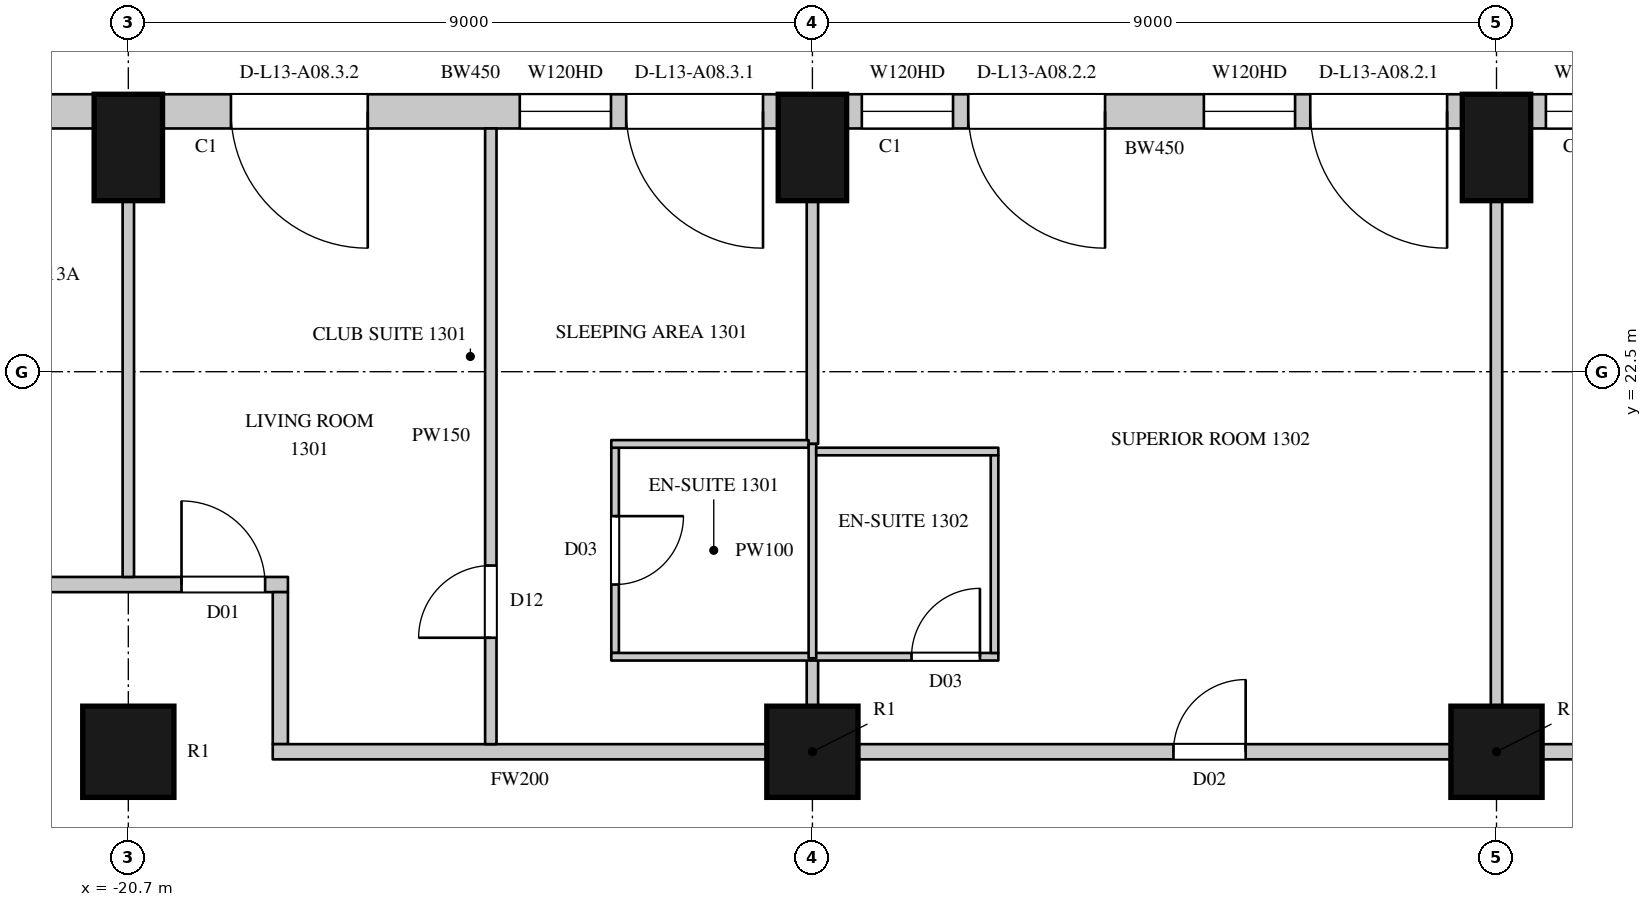
"""IFC4 building model, lengths in metres.
Left out: names, types, materials, properties, quantities, classifications, styles, units other than length and angle.
Written with IfcOpenShell. Run it as: python <this file> out.ifc"""

import sys

from ifc_helpers import new_model, si_unit, direction, frame, frame_2d, origin, origin_2d, place, context, subcontext, project, spatial, rectangle, circle, extrude, element, fill, save


model = new_model("IFC4")
c1 = context("Model", 3, precision=1e-05, world=origin(), true_north=direction((0.0, 1.0)))
c2 = subcontext(c1, "Body", "Model", "MODEL_VIEW")
j1 = project(units=[si_unit("LENGTHUNIT", "METRE"), si_unit("PLANEANGLEUNIT", "RADIAN")], contexts=[c1])
p1 = place(None, origin())
s1 = spatial("IfcSite", under=j1, at=p1, CompositionType="ELEMENT")
p2 = place(p1, origin())
s2 = spatial("IfcBuilding", under=s1, at=p2, CompositionType="ELEMENT")
p3 = place(p2, frame((0.0, 0.0, 77.1)))
s3 = spatial("IfcBuildingStorey", under=s2, at=p3, CompositionType="ELEMENT", Elevation=77.1)
for number, where, z_axis, x_axis in (
    (1, (-2.7, 25.45, 0.0), (0.0, 0.0, 1.0), (-1.0, 0.0, 0.0)),
    (2, (-11.7, 25.45, 0.0), (0.0, 0.0, 1.0), (-1.0, 0.0, 0.0)),
    (3, (-20.7, 25.45, 0.0), (0.0, 0.0, 1.0), (-1.0, 0.0, 0.0)),
):
    element("IfcColumn", number, at=place(p3, frame(where, z_axis=z_axis, x_axis=x_axis)), inside=s3, PredefinedType="COLUMN", context=c2, shape_type="SweptSolid", body=[
        extrude(rectangle(XDim=0.9, YDim=1.4, at=origin_2d()), origin(), (0.0, 0.0, 1.0), 3.6),
    ])
for number, where, z_axis, x_axis in (
    (4, (-20.7, 17.5, 0.0), (0.0, 0.0, 1.0), (1.0, 0.0, 0.0)),
    (5, (-11.7, 17.5, 0.0), (0.0, 0.0, 1.0), (1.0, 0.0, 0.0)),
    (6, (-2.7, 17.5, 0.0), (0.0, 0.0, 1.0), (1.0, 0.0, 0.0)),
):
    element("IfcColumn", number, at=place(p3, frame(where, z_axis=z_axis, x_axis=x_axis)), inside=s3, PredefinedType="COLUMN", context=c2, shape_type="SweptSolid", body=[
        extrude(circle(Radius=0.6, at=origin_2d()), origin(), (0.0, 0.0, 1.0), 3.6),
    ])
p4 = place(p3, frame((5.85, 25.925, 0.0), z_axis=(0.0, 0.0, 1.0), x_axis=(-1.0, 0.0, 0.0)))
e7 = element("IfcWall", 7, at=p4, inside=s3, PredefinedType="SOLIDWALL", context=c2, shape_type="SweptSolid", body=[
    extrude(rectangle(XDim=8.1, YDim=0.45, at=frame_2d((4.05, 0.0))), origin(), (0.0, 0.0, 1.0), 3.3),
])
p5 = place(p4, frame((0.2, 0.0, 0.0)))
e8 = element("IfcOpeningElement", 8, at=p5, cuts=e7, PredefinedType="OPENING", context=c2, shape_type="SweptSolid", body=[
    extrude(rectangle(XDim=1.8, YDim=2.4, at=frame_2d((0.9, 1.2))), frame((0.0, 0.235, 0.0), z_axis=(0.0, -1.0, 0.0), x_axis=(1.0, 0.0, 0.0)), (0.0, 0.0, 1.0), 0.47),
])
p6 = place(p4, frame((2.2, 0.0, 1.05)))
e9 = element("IfcOpeningElement", 9, at=p6, cuts=e7, PredefinedType="OPENING", context=c2, shape_type="SweptSolid", body=[
    extrude(rectangle(XDim=1.2, YDim=2.0, at=frame_2d((0.6, 1.0))), frame((0.0, 0.235, 0.0), z_axis=(0.0, -1.0, 0.0), x_axis=(1.0, 0.0, 0.0)), (0.0, 0.0, 1.0), 0.47),
])
p7 = place(p4, frame((4.7, 0.0, 0.0)))
e10 = element("IfcOpeningElement", 10, at=p7, cuts=e7, PredefinedType="OPENING", context=c2, shape_type="SweptSolid", body=[
    extrude(rectangle(XDim=1.8, YDim=2.4, at=frame_2d((0.9, 1.2))), frame((0.0, 0.235, 0.0), z_axis=(0.0, -1.0, 0.0), x_axis=(1.0, 0.0, 0.0)), (0.0, 0.0, 1.0), 0.47),
])
p8 = place(p4, frame((6.7, 0.0, 1.05)))
e11 = element("IfcOpeningElement", 11, at=p8, cuts=e7, PredefinedType="OPENING", context=c2, shape_type="SweptSolid", body=[
    extrude(rectangle(XDim=1.2, YDim=2.0, at=frame_2d((0.6, 1.0))), frame((0.0, 0.235, 0.0), z_axis=(0.0, -1.0, 0.0), x_axis=(1.0, 0.0, 0.0)), (0.0, 0.0, 1.0), 0.47),
])
p9 = place(p3, frame((-3.15, 25.925, 0.0), z_axis=(0.0, 0.0, 1.0), x_axis=(-1.0, 0.0, 0.0)))
e12 = element("IfcWall", 12, at=p9, inside=s3, PredefinedType="SOLIDWALL", context=c2, shape_type="SweptSolid", body=[
    extrude(rectangle(XDim=8.1, YDim=0.45, at=frame_2d((4.05, 0.0))), origin(), (0.0, 0.0, 1.0), 3.3),
])
p10 = place(p9, frame((0.2, 0.0, 0.0)))
e13 = element("IfcOpeningElement", 13, at=p10, cuts=e12, PredefinedType="OPENING", context=c2, shape_type="SweptSolid", body=[
    extrude(rectangle(XDim=1.8, YDim=2.4, at=frame_2d((0.9, 1.2))), frame((0.0, 0.235, 0.0), z_axis=(0.0, -1.0, 0.0), x_axis=(1.0, 0.0, 0.0)), (0.0, 0.0, 1.0), 0.47),
])
p11 = place(p9, frame((2.2, 0.0, 1.05)))
e14 = element("IfcOpeningElement", 14, at=p11, cuts=e12, PredefinedType="OPENING", context=c2, shape_type="SweptSolid", body=[
    extrude(rectangle(XDim=1.2, YDim=2.0, at=frame_2d((0.6, 1.0))), frame((0.0, 0.235, 0.0), z_axis=(0.0, -1.0, 0.0), x_axis=(1.0, 0.0, 0.0)), (0.0, 0.0, 1.0), 0.47),
])
p12 = place(p9, frame((4.7, 0.0, 0.0)))
e15 = element("IfcOpeningElement", 15, at=p12, cuts=e12, PredefinedType="OPENING", context=c2, shape_type="SweptSolid", body=[
    extrude(rectangle(XDim=1.8, YDim=2.4, at=frame_2d((0.9, 1.2))), frame((0.0, 0.235, 0.0), z_axis=(0.0, -1.0, 0.0), x_axis=(1.0, 0.0, 0.0)), (0.0, 0.0, 1.0), 0.47),
])
p13 = place(p9, frame((6.7, 0.0, 1.05)))
e16 = element("IfcOpeningElement", 16, at=p13, cuts=e12, PredefinedType="OPENING", context=c2, shape_type="SweptSolid", body=[
    extrude(rectangle(XDim=1.2, YDim=2.0, at=frame_2d((0.6, 1.0))), frame((0.0, 0.235, 0.0), z_axis=(0.0, -1.0, 0.0), x_axis=(1.0, 0.0, 0.0)), (0.0, 0.0, 1.0), 0.47),
])
p14 = place(p3, frame((-12.15, 25.925, 0.0), z_axis=(0.0, 0.0, 1.0), x_axis=(-1.0, 0.0, 0.0)))
e17 = element("IfcWall", 17, at=p14, inside=s3, PredefinedType="SOLIDWALL", context=c2, shape_type="SweptSolid", body=[
    extrude(rectangle(XDim=8.1, YDim=0.45, at=frame_2d((4.05, 0.0))), origin(), (0.0, 0.0, 1.0), 3.3),
])
p15 = place(p14, frame((0.2, 0.0, 0.0)))
e18 = element("IfcOpeningElement", 18, at=p15, cuts=e17, PredefinedType="OPENING", context=c2, shape_type="SweptSolid", body=[
    extrude(rectangle(XDim=1.8, YDim=2.4, at=frame_2d((0.9, 1.2))), frame((0.0, 0.235, 0.0), z_axis=(0.0, -1.0, 0.0), x_axis=(1.0, 0.0, 0.0)), (0.0, 0.0, 1.0), 0.47),
])
p16 = place(p14, frame((2.2, 0.0, 1.05)))
e19 = element("IfcOpeningElement", 19, at=p16, cuts=e17, PredefinedType="OPENING", context=c2, shape_type="SweptSolid", body=[
    extrude(rectangle(XDim=1.2, YDim=2.0, at=frame_2d((0.6, 1.0))), frame((0.0, 0.235, 0.0), z_axis=(0.0, -1.0, 0.0), x_axis=(1.0, 0.0, 0.0)), (0.0, 0.0, 1.0), 0.47),
])
p17 = place(p14, frame((5.4, 0.0, 0.0)))
e20 = element("IfcOpeningElement", 20, at=p17, cuts=e17, PredefinedType="OPENING", context=c2, shape_type="SweptSolid", body=[
    extrude(rectangle(XDim=1.8, YDim=2.4, at=frame_2d((0.9, 1.2))), frame((0.0, 0.235, 0.0), z_axis=(0.0, -1.0, 0.0), x_axis=(1.0, 0.0, 0.0)), (0.0, 0.0, 1.0), 0.47),
])
p18 = place(p3, frame((-21.15, 25.925, 0.0), z_axis=(0.0, 0.0, 1.0), x_axis=(-1.0, 0.0, 0.0)))
e21 = element("IfcWall", 21, at=p18, inside=s3, PredefinedType="SOLIDWALL", context=c2, shape_type="SweptSolid", body=[
    extrude(rectangle(XDim=2.914, YDim=0.45, at=frame_2d((1.457, 0.0))), origin(), (0.0, 0.0, 1.0), 3.3),
])
p19 = place(p3, frame((-23.7, 19.7, 0.0), z_axis=(0.0, 0.0, 1.0), x_axis=(1.0, 0.0, 0.0)))
e22 = element("IfcWall", 22, at=p19, inside=s3, PredefinedType="PARTITIONING", context=c2, shape_type="SweptSolid", body=[
    extrude(rectangle(XDim=5.1, YDim=0.2, at=frame_2d((2.55, 0.0))), origin(), (0.0, 0.0, 1.0), 3.3),
])
p20 = place(p19, frame((0.8, 0.0, 0.0)))
e23 = element("IfcOpeningElement", 23, at=p20, cuts=e22, PredefinedType="OPENING", context=c2, shape_type="SweptSolid", body=[
    extrude(rectangle(XDim=0.9, YDim=2.2, at=frame_2d((0.45, 1.1))), frame((0.0, 0.11, 0.0), z_axis=(0.0, -1.0, 0.0), x_axis=(1.0, 0.0, 0.0)), (0.0, 0.0, 1.0), 0.22),
])
p21 = place(p19, frame((3.7, 0.0, 0.0)))
e24 = element("IfcOpeningElement", 24, at=p21, cuts=e22, PredefinedType="OPENING", context=c2, shape_type="SweptSolid", body=[
    extrude(rectangle(XDim=1.1, YDim=2.4, at=frame_2d((0.55, 1.2))), frame((0.0, 0.11, 0.0), z_axis=(0.0, -1.0, 0.0), x_axis=(1.0, 0.0, 0.0)), (0.0, 0.0, 1.0), 0.22),
])
p22 = place(p3, frame((-18.7, 17.6, 0.0), z_axis=(0.0, 0.0, 1.0), x_axis=(0.0, 1.0, 0.0)))
e25 = element("IfcWall", 25, at=p22, inside=s3, PredefinedType="PARTITIONING", context=c2, shape_type="SweptSolid", body=[
    extrude(rectangle(XDim=2.0, YDim=0.2, at=frame_2d((1.0, 0.0))), origin(), (0.0, 0.0, 1.0), 3.3),
])
p23 = place(p3, frame((-18.8, 17.5, 0.0), z_axis=(0.0, 0.0, 1.0), x_axis=(1.0, 0.0, 0.0)))
e26 = element("IfcWall", 26, at=p23, inside=s3, PredefinedType="PARTITIONING", context=c2, shape_type="SweptSolid", body=[
    extrude(rectangle(XDim=6.5, YDim=0.2, at=frame_2d((3.25, 0.0))), origin(), (0.0, 0.0, 1.0), 2.75),
])
p24 = place(p3, frame((-11.1, 17.5, 0.0), z_axis=(0.0, 0.0, 1.0), x_axis=(1.0, 0.0, 0.0)))
e27 = element("IfcWall", 27, at=p24, inside=s3, PredefinedType="PARTITIONING", context=c2, shape_type="SweptSolid", body=[
    extrude(rectangle(XDim=7.8, YDim=0.2, at=frame_2d((3.9, 0.0))), origin(), (0.0, 0.0, 1.0), 2.75),
])
p25 = place(p24, frame((4.15, 0.0, 0.0)))
e28 = element("IfcOpeningElement", 28, at=p25, cuts=e27, PredefinedType="OPENING", context=c2, shape_type="SweptSolid", body=[
    extrude(rectangle(XDim=0.95, YDim=2.2, at=frame_2d((0.475, 1.1))), frame((0.0, 0.11, 0.0), z_axis=(0.0, -1.0, 0.0), x_axis=(1.0, 0.0, 0.0)), (0.0, 0.0, 1.0), 0.22),
])
p26 = place(p3, frame((-2.1, 17.5, 0.0), z_axis=(0.0, 0.0, 1.0), x_axis=(1.0, 0.0, 0.0)))
e29 = element("IfcWall", 29, at=p26, inside=s3, PredefinedType="PARTITIONING", context=c2, shape_type="SweptSolid", body=[
    extrude(rectangle(XDim=7.8, YDim=0.2, at=frame_2d((3.9, 0.0))), origin(), (0.0, 0.0, 1.0), 2.75),
])
p27 = place(p26, frame((1.55, 0.0, 0.0)))
e30 = element("IfcOpeningElement", 30, at=p27, cuts=e29, PredefinedType="OPENING", context=c2, shape_type="SweptSolid", body=[
    extrude(rectangle(XDim=1.1, YDim=2.4, at=frame_2d((0.55, 1.2))), frame((0.0, 0.11, 0.0), z_axis=(0.0, -1.0, 0.0), x_axis=(1.0, 0.0, 0.0)), (0.0, 0.0, 1.0), 0.22),
])
p28 = place(p3, frame((-20.7, 19.8, 0.0), z_axis=(0.0, 0.0, 1.0), x_axis=(0.0, 1.0, 0.0)))
e31 = element("IfcWall", 31, at=p28, inside=s3, PredefinedType="PARTITIONING", context=c2, shape_type="SweptSolid", body=[
    extrude(rectangle(XDim=4.95, YDim=0.15, at=frame_2d((2.475, 0.0))), origin(), (0.0, 0.0, 1.0), 2.75),
])
p29 = place(p3, frame((-15.931, 17.6, 0.0), z_axis=(0.0, 0.0, 1.0), x_axis=(0.0, 1.0, 0.0)))
e32 = element("IfcWall", 32, at=p29, inside=s3, PredefinedType="PARTITIONING", context=c2, shape_type="SweptSolid", body=[
    extrude(rectangle(XDim=8.1, YDim=0.15, at=frame_2d((4.05, 0.0))), origin(), (0.0, 0.0, 1.0), 3.3),
])
p30 = place(p29, frame((1.4, 0.0, 0.0)))
e33 = element("IfcOpeningElement", 33, at=p30, cuts=e32, PredefinedType="OPENING", context=c2, shape_type="SweptSolid", body=[
    extrude(rectangle(XDim=0.95, YDim=2.2, at=frame_2d((0.475, 1.1))), frame((0.0, 0.085, 0.0), z_axis=(0.0, -1.0, 0.0), x_axis=(1.0, 0.0, 0.0)), (0.0, 0.0, 1.0), 0.17),
])
p31 = place(p3, frame((-11.7, 18.1, 0.0), z_axis=(0.0, 0.0, 1.0), x_axis=(0.0, 1.0, 0.0)))
e34 = element("IfcWall", 34, at=p31, inside=s3, PredefinedType="PARTITIONING", context=c2, shape_type="SweptSolid", body=[
    extrude(rectangle(XDim=0.63, YDim=0.15, at=frame_2d((0.315, 0.0))), origin(), (0.0, 0.0, 1.0), 2.75),
])
p32 = place(p3, frame((-11.7, 21.55, 0.0), z_axis=(0.0, 0.0, 1.0), x_axis=(0.0, 1.0, 0.0)))
e35 = element("IfcWall", 35, at=p32, inside=s3, PredefinedType="PARTITIONING", context=c2, shape_type="SweptSolid", body=[
    extrude(rectangle(XDim=3.2, YDim=0.15, at=frame_2d((1.6, 0.0))), origin(), (0.0, 0.0, 1.0), 2.75),
])
p33 = place(p3, frame((-2.7, 18.1, 0.0), z_axis=(0.0, 0.0, 1.0), x_axis=(0.0, 1.0, 0.0)))
e36 = element("IfcWall", 36, at=p33, inside=s3, PredefinedType="PARTITIONING", context=c2, shape_type="SweptSolid", body=[
    extrude(rectangle(XDim=6.65, YDim=0.15, at=frame_2d((3.325, 0.0))), origin(), (0.0, 0.0, 1.0), 2.75),
])
p34 = place(p3, frame((-14.296, 18.8, 0.0), z_axis=(0.0, 0.0, 1.0), x_axis=(0.0, 1.0, 0.0)))
e37 = element("IfcWall", 37, at=p34, inside=s3, PredefinedType="PARTITIONING", context=c2, shape_type="SweptSolid", body=[
    extrude(rectangle(XDim=2.7, YDim=0.1, at=frame_2d((1.35, 0.0))), origin(), (0.0, 0.0, 1.0), 3.3),
])
p35 = place(p34, frame((0.9, 0.0, 0.0)))
e38 = element("IfcOpeningElement", 38, at=p35, cuts=e37, PredefinedType="OPENING", context=c2, shape_type="SweptSolid", body=[
    extrude(rectangle(XDim=0.9, YDim=2.2, at=frame_2d((0.45, 1.1))), frame((0.0, 0.06, 0.0), z_axis=(0.0, -1.0, 0.0), x_axis=(1.0, 0.0, 0.0)), (0.0, 0.0, 1.0), 0.12),
])
p36 = place(p3, frame((-14.346, 18.75, 0.0), z_axis=(0.0, 0.0, 1.0), x_axis=(1.0, 0.0, 0.0)))
e39 = element("IfcWall", 39, at=p36, inside=s3, PredefinedType="PARTITIONING", context=c2, shape_type="SweptSolid", body=[
    extrude(rectangle(XDim=5.092, YDim=0.1, at=frame_2d((2.546, 0.0))), origin(), (0.0, 0.0, 1.0), 3.3),
])
p37 = place(p36, frame((3.95, 0.0, 0.0)))
e40 = element("IfcOpeningElement", 40, at=p37, cuts=e39, PredefinedType="OPENING", context=c2, shape_type="SweptSolid", body=[
    extrude(rectangle(XDim=0.9, YDim=2.2, at=frame_2d((0.45, 1.1))), frame((0.0, 0.06, 0.0), z_axis=(0.0, -1.0, 0.0), x_axis=(1.0, 0.0, 0.0)), (0.0, 0.0, 1.0), 0.12),
])
p38 = place(p3, frame((-14.346, 21.55, 0.0), z_axis=(0.0, 0.0, 1.0), x_axis=(1.0, 0.0, 0.0)))
e41 = element("IfcWall", 41, at=p38, inside=s3, PredefinedType="PARTITIONING", context=c2, shape_type="SweptSolid", body=[
    extrude(rectangle(XDim=2.596, YDim=0.1, at=frame_2d((1.298, 0.0))), origin(), (0.0, 0.0, 1.0), 3.3),
])
p39 = place(p3, frame((-11.7, 18.73, 0.0), z_axis=(0.0, 0.0, 1.0), x_axis=(0.0, 1.0, 0.0)))
e42 = element("IfcWall", 42, at=p39, inside=s3, PredefinedType="PARTITIONING", context=c2, shape_type="SweptSolid", body=[
    extrude(rectangle(XDim=2.82, YDim=0.1, at=frame_2d((1.41, 0.0))), origin(), (0.0, 0.0, 1.0), 2.75),
])
p40 = place(p3, frame((-11.65, 21.45, 0.0), z_axis=(0.0, 0.0, 1.0), x_axis=(1.0, 0.0, 0.0)))
e43 = element("IfcWall", 43, at=p40, inside=s3, PredefinedType="PARTITIONING", context=c2, shape_type="SweptSolid", body=[
    extrude(rectangle(XDim=2.396, YDim=0.1, at=frame_2d((1.198, 0.0))), origin(), (0.0, 0.0, 1.0), 3.3),
])
p41 = place(p3, frame((-9.304, 18.8, 0.0), z_axis=(0.0, 0.0, 1.0), x_axis=(0.0, 1.0, 0.0)))
e44 = element("IfcWall", 44, at=p41, inside=s3, PredefinedType="PARTITIONING", context=c2, shape_type="SweptSolid", body=[
    extrude(rectangle(XDim=2.6, YDim=0.1, at=frame_2d((1.3, 0.0))), origin(), (0.0, 0.0, 1.0), 3.3),
])
p42 = place(p8, origin())
e45 = element("IfcWindow", 45, at=p42, inside=s3, PartitioningType="SINGLE_PANEL", PredefinedType="WINDOW", context=c2, shape_type="SweptSolid", body=[
    extrude(rectangle(XDim=1.2, YDim=2.0, at=frame_2d((0.6, 1.0))), frame((0.0, 0.135, 0.0), z_axis=(0.0, -1.0, 0.0), x_axis=(1.0, 0.0, 0.0)), (0.0, 0.0, 1.0), 0.06),
])
fill(e11, e45)
p43 = place(p10, origin())
e46 = element("IfcDoor", 46, at=p43, inside=s3, OperationType="SLIDING_TO_LEFT", PredefinedType="DOOR", context=c2, shape_type="SweptSolid", body=[
    extrude(rectangle(XDim=1.8, YDim=2.4, at=frame_2d((0.9, 1.2))), frame((0.0, 0.13, 0.0), z_axis=(0.0, -1.0, 0.0), x_axis=(1.0, 0.0, 0.0)), (0.0, 0.0, 1.0), 0.05),
])
fill(e13, e46)
p44 = place(p11, origin())
e47 = element("IfcWindow", 47, at=p44, inside=s3, PartitioningType="SINGLE_PANEL", PredefinedType="WINDOW", context=c2, shape_type="SweptSolid", body=[
    extrude(rectangle(XDim=1.2, YDim=2.0, at=frame_2d((0.6, 1.0))), frame((0.0, 0.135, 0.0), z_axis=(0.0, -1.0, 0.0), x_axis=(1.0, 0.0, 0.0)), (0.0, 0.0, 1.0), 0.06),
])
fill(e14, e47)
p45 = place(p12, origin())
e48 = element("IfcDoor", 48, at=p45, inside=s3, OperationType="SLIDING_TO_LEFT", PredefinedType="DOOR", context=c2, shape_type="SweptSolid", body=[
    extrude(rectangle(XDim=1.8, YDim=2.4, at=frame_2d((0.9, 1.2))), frame((0.0, 0.13, 0.0), z_axis=(0.0, -1.0, 0.0), x_axis=(1.0, 0.0, 0.0)), (0.0, 0.0, 1.0), 0.05),
])
fill(e15, e48)
p46 = place(p13, origin())
e49 = element("IfcWindow", 49, at=p46, inside=s3, PartitioningType="SINGLE_PANEL", PredefinedType="WINDOW", context=c2, shape_type="SweptSolid", body=[
    extrude(rectangle(XDim=1.2, YDim=2.0, at=frame_2d((0.6, 1.0))), frame((0.0, 0.135, 0.0), z_axis=(0.0, -1.0, 0.0), x_axis=(1.0, 0.0, 0.0)), (0.0, 0.0, 1.0), 0.06),
])
fill(e16, e49)
p47 = place(p15, origin())
e50 = element("IfcDoor", 50, at=p47, inside=s3, OperationType="SLIDING_TO_LEFT", PredefinedType="DOOR", context=c2, shape_type="SweptSolid", body=[
    extrude(rectangle(XDim=1.8, YDim=2.4, at=frame_2d((0.9, 1.2))), frame((0.0, 0.13, 0.0), z_axis=(0.0, -1.0, 0.0), x_axis=(1.0, 0.0, 0.0)), (0.0, 0.0, 1.0), 0.05),
])
fill(e18, e50)
p48 = place(p16, origin())
e51 = element("IfcWindow", 51, at=p48, inside=s3, PartitioningType="SINGLE_PANEL", PredefinedType="WINDOW", context=c2, shape_type="SweptSolid", body=[
    extrude(rectangle(XDim=1.2, YDim=2.0, at=frame_2d((0.6, 1.0))), frame((0.0, 0.135, 0.0), z_axis=(0.0, -1.0, 0.0), x_axis=(1.0, 0.0, 0.0)), (0.0, 0.0, 1.0), 0.06),
])
fill(e19, e51)
p49 = place(p17, origin())
e52 = element("IfcDoor", 52, at=p49, inside=s3, OperationType="SLIDING_TO_LEFT", PredefinedType="DOOR", context=c2, shape_type="SweptSolid", body=[
    extrude(rectangle(XDim=1.8, YDim=2.4, at=frame_2d((0.9, 1.2))), frame((0.0, 0.13, 0.0), z_axis=(0.0, -1.0, 0.0), x_axis=(1.0, 0.0, 0.0)), (0.0, 0.0, 1.0), 0.05),
])
fill(e20, e52)
p50 = place(p21, origin())
e53 = element("IfcDoor", 53, at=p50, inside=s3, OperationType="SINGLE_SWING_LEFT", PredefinedType="DOOR", context=c2, shape_type="SweptSolid", body=[
    extrude(rectangle(XDim=1.1, YDim=2.4, at=frame_2d((0.55, 1.2))), frame((0.0, 0.025, 0.0), z_axis=(0.0, -1.0, 0.0), x_axis=(1.0, 0.0, 0.0)), (0.0, 0.0, 1.0), 0.05),
])
fill(e24, e53)
p51 = place(p30, origin())
e54 = element("IfcDoor", 54, at=p51, inside=s3, OperationType="SINGLE_SWING_LEFT", PredefinedType="DOOR", context=c2, shape_type="SweptSolid", body=[
    extrude(rectangle(XDim=0.95, YDim=2.2, at=frame_2d((0.475, 1.1))), frame((0.0, 0.025, 0.0), z_axis=(0.0, -1.0, 0.0), x_axis=(1.0, 0.0, 0.0)), (0.0, 0.0, 1.0), 0.05),
])
fill(e33, e54)
p52 = place(p35, origin())
e55 = element("IfcDoor", 55, at=p52, inside=s3, OperationType="SINGLE_SWING_LEFT", PredefinedType="DOOR", context=c2, shape_type="SweptSolid", body=[
    extrude(rectangle(XDim=0.9, YDim=2.2, at=frame_2d((0.45, 1.1))), frame((0.0, 0.025, 0.0), z_axis=(0.0, -1.0, 0.0), x_axis=(1.0, 0.0, 0.0)), (0.0, 0.0, 1.0), 0.05),
])
fill(e38, e55)
p53 = place(p25, origin())
e56 = element("IfcDoor", 56, at=p53, inside=s3, OperationType="SINGLE_SWING_RIGHT", PredefinedType="DOOR", context=c2, shape_type="SweptSolid", body=[
    extrude(rectangle(XDim=0.95, YDim=2.2, at=frame_2d((0.475, 1.1))), frame((0.0, 0.025, 0.0), z_axis=(0.0, -1.0, 0.0), x_axis=(1.0, 0.0, 0.0)), (0.0, 0.0, 1.0), 0.05),
])
fill(e28, e56)
p54 = place(p37, origin())
e57 = element("IfcDoor", 57, at=p54, inside=s3, OperationType="SINGLE_SWING_RIGHT", PredefinedType="DOOR", context=c2, shape_type="SweptSolid", body=[
    extrude(rectangle(XDim=0.9, YDim=2.2, at=frame_2d((0.45, 1.1))), frame((0.0, 0.025, 0.0), z_axis=(0.0, -1.0, 0.0), x_axis=(1.0, 0.0, 0.0)), (0.0, 0.0, 1.0), 0.05),
])
fill(e40, e57)
save(model, sys.argv[1])
